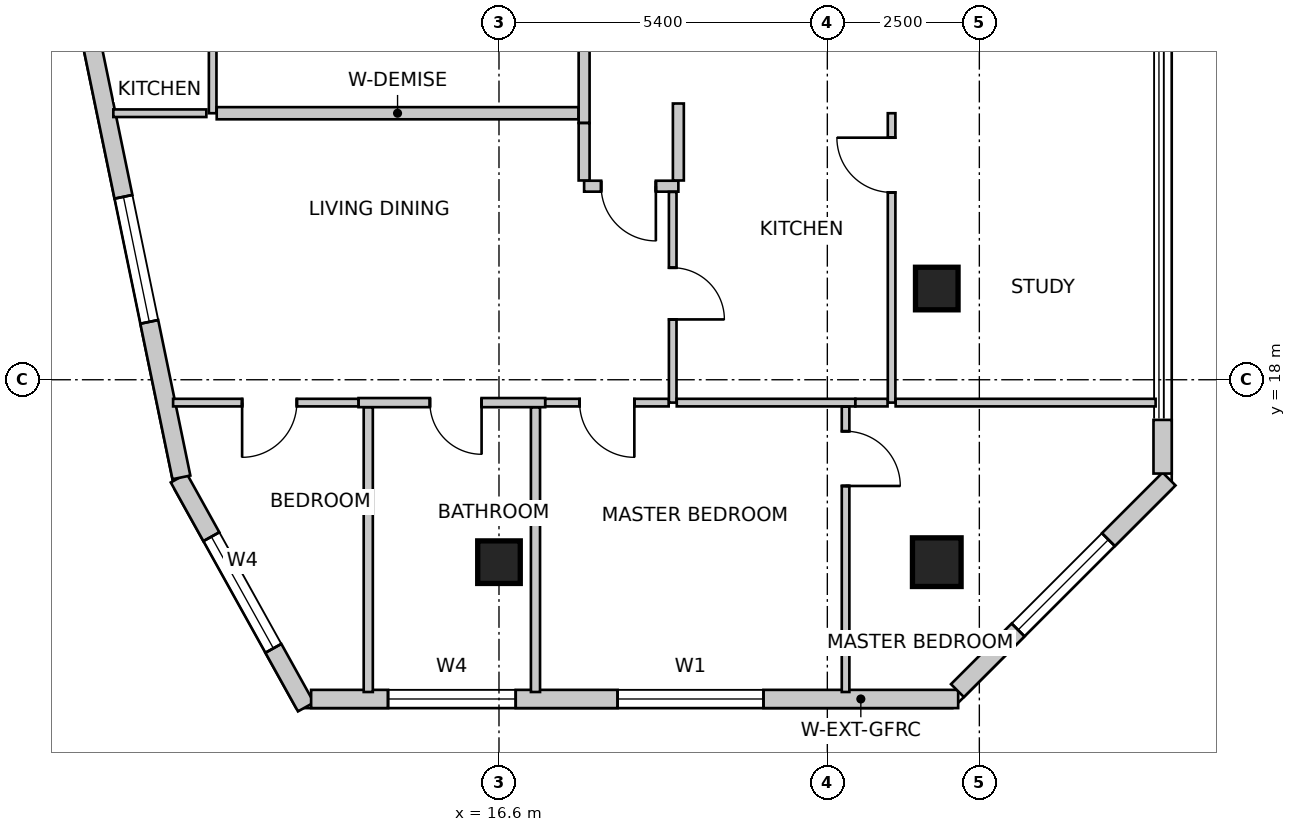
"""IFC4 building model, lengths in metres.
Left out: names, types, materials, properties, quantities, classifications, styles, units other than length and angle.
Written with IfcOpenShell. Run it as: python <this file> out.ifc"""

import sys

from ifc_helpers import new_model, si_unit, direction, frame, frame_2d, origin, origin_2d, place, context, subcontext, project, spatial, rectangle, extrude, source, transform, mapped, element, fill, save


model = new_model("IFC4")
c1 = context("Model", 3, precision=1e-05, world=origin(), true_north=direction((0.0, 1.0)))
c2 = subcontext(c1, "Body", "Model", "MODEL_VIEW")
j1 = project(units=[si_unit("LENGTHUNIT", "METRE"), si_unit("PLANEANGLEUNIT", "RADIAN")], contexts=[c1])
p1 = place(None, origin())
s1 = spatial("IfcSite", under=j1, at=p1, CompositionType="ELEMENT")
p2 = place(p1, origin())
s2 = spatial("IfcBuilding", under=s1, at=p2, CompositionType="ELEMENT")
p3 = place(p2, frame((0.0, 0.0, 214.9)))
s3 = spatial("IfcBuildingStorey", under=s2, at=p3, CompositionType="ELEMENT", Elevation=214.9)
m1 = source(origin(), c2, "Body", "SweptSolid", [
    extrude(rectangle(XDim=0.7, YDim=0.7, at=origin_2d()), origin(), (0.0, 0.0, 1.0), 3.5),
])
p4 = place(p3, frame((23.8, 19.5, 0.0), z_axis=(0.0, 0.0, 1.0), x_axis=(1.0, 0.0, 0.0)))
e1 = element("IfcColumn", 1, at=p4, inside=s3, PredefinedType="COLUMN", context=c2, shape_type="MappedRepresentation", body=[
    mapped(m1, transform((0.0, 0.0, 0.0), scale=1.0)),
])
m2 = source(origin(), c2, "Body", "SweptSolid", [
    extrude(rectangle(XDim=0.8, YDim=0.8, at=origin_2d()), origin(), (0.0, 0.0, 1.0), 3.5),
])
p5 = place(p3, frame((23.8, 15.0, 0.0), z_axis=(0.0, 0.0, 1.0), x_axis=(1.0, 0.0, 0.0)))
e2 = element("IfcColumn", 2, at=p5, inside=s3, PredefinedType="COLUMN", context=c2, shape_type="MappedRepresentation", body=[
    mapped(m2, transform((0.0, 0.0, 0.0), scale=1.0)),
])
p6 = place(p3, frame((16.6, 15.0, 0.0), z_axis=(0.0, 0.0, 1.0), x_axis=(1.0, 0.0, 0.0)))
e3 = element("IfcColumn", 3, at=p6, inside=s3, PredefinedType="COLUMN", context=c2, shape_type="MappedRepresentation", body=[
    mapped(m1, transform((0.0, 0.0, 0.0), scale=1.0)),
])
p7 = place(p3, frame((11.333, 16.384, 0.0), z_axis=(0.0, 0.0, 1.0), x_axis=(0.485633305139, -0.874162623852, 0.0)))
e4 = element("IfcWall", 4, at=p7, inside=s3, PredefinedType="SOLIDWALL", context=c2, shape_type="SweptSolid", body=[
    extrude(rectangle(XDim=4.307, YDim=0.3, at=frame_2d((2.153, 0.0))), origin(), (0.0, 0.0, 1.0), 3.25),
])
m3 = source(origin(), c2, "Body", "SweptSolid", [
    extrude(rectangle(XDim=2.1, YDim=2.0, at=frame_2d((1.05, 1.0))), frame((0.0, 0.16, 0.0), z_axis=(0.0, -1.0, 0.0), x_axis=(1.0, 0.0, 0.0)), (0.0, 0.0, 1.0), 0.32),
])
p8 = place(p7, frame((1.104, 0.0, 0.85)))
e5 = element("IfcOpeningElement", 5, at=p8, cuts=e4, PredefinedType="OPENING", context=c2, shape_type="MappedRepresentation", body=[
    mapped(m3, transform((0.0, 0.0, 0.0), scale=1.0)),
])
p9 = place(p3, frame((13.51, 12.75, 0.0), z_axis=(0.0, 0.0, 1.0), x_axis=(1.0, 0.0, 0.0)))
e6 = element("IfcWall", 6, at=p9, inside=s3, PredefinedType="SOLIDWALL", context=c2, shape_type="SweptSolid", body=[
    extrude(rectangle(XDim=10.642, YDim=0.3, at=frame_2d((5.321, 0.0))), origin(), (0.0, 0.0, 1.0), 3.25),
])
p10 = place(p9, frame((1.265, 0.0, 0.85)))
e7 = element("IfcOpeningElement", 7, at=p10, cuts=e6, PredefinedType="OPENING", context=c2, shape_type="MappedRepresentation", body=[
    mapped(m3, transform((0.0, 0.0, 0.0), scale=1.0)),
])
m4 = source(origin(), c2, "Body", "SweptSolid", [
    extrude(rectangle(XDim=2.4, YDim=2.2, at=frame_2d((1.2, 1.1))), frame((0.0, 0.16, 0.0), z_axis=(0.0, -1.0, 0.0), x_axis=(1.0, 0.0, 0.0)), (0.0, 0.0, 1.0), 0.32),
])
p11 = place(p9, frame((5.04, 0.0, 0.85)))
e8 = element("IfcOpeningElement", 8, at=p11, cuts=e6, PredefinedType="OPENING", context=c2, shape_type="MappedRepresentation", body=[
    mapped(m4, transform((0.0, 0.0, 0.0), scale=1.0)),
])
p12 = place(p3, frame((24.14, 12.888, 0.0), z_axis=(0.0, 0.0, 1.0), x_axis=(0.707106781187, 0.707106781187, 0.0)))
e9 = element("IfcWall", 9, at=p12, inside=s3, PredefinedType="SOLIDWALL", context=c2, shape_type="SweptSolid", body=[
    extrude(rectangle(XDim=4.922, YDim=0.3, at=frame_2d((2.461, 0.0))), origin(), (0.0, 0.0, 1.0), 3.25),
])
p13 = place(p12, frame((1.411, 0.0, 0.85)))
e10 = element("IfcOpeningElement", 10, at=p13, cuts=e9, PredefinedType="OPENING", context=c2, shape_type="MappedRepresentation", body=[
    mapped(m3, transform((0.0, 0.0, 0.0), scale=1.0)),
])
p14 = place(p3, frame((27.514, 16.457, 0.0), z_axis=(0.0, 0.0, 1.0), x_axis=(0.0, 1.0, 0.0)))
e11 = element("IfcWall", 11, at=p14, inside=s3, PredefinedType="SOLIDWALL", context=c2, shape_type="SweptSolid", body=[
    extrude(rectangle(XDim=0.882, YDim=0.3, at=frame_2d((0.441, 0.0))), origin(), (0.0, 0.0, 1.0), 3.25),
])
p15 = place(p3, frame((8.188, 31.834, 0.0), z_axis=(0.0, 0.0, 1.0), x_axis=(0.202303475707, -0.979322880217, 0.0)))
e12 = element("IfcWall", 12, at=p15, inside=s3, PredefinedType="SOLIDWALL", context=c2, shape_type="SweptSolid", body=[
    extrude(rectangle(XDim=15.766, YDim=0.3, at=frame_2d((7.883, 0.0))), origin(), (0.0, 0.0, 1.0), 3.25),
])
p16 = place(p15, frame((1.407, 0.0, 0.85)))
e13 = element("IfcOpeningElement", 13, at=p16, cuts=e12, PredefinedType="OPENING", context=c2, shape_type="MappedRepresentation", body=[
    mapped(m3, transform((0.0, 0.0, 0.0), scale=1.0)),
])
p17 = place(p15, frame((6.194, 0.0, 0.85)))
e14 = element("IfcOpeningElement", 14, at=p17, cuts=e12, PredefinedType="OPENING", context=c2, shape_type="MappedRepresentation", body=[
    mapped(m3, transform((0.0, 0.0, 0.0), scale=1.0)),
])
p18 = place(p15, frame((11.054, 0.0, 0.85)))
e15 = element("IfcOpeningElement", 15, at=p18, cuts=e12, PredefinedType="OPENING", context=c2, shape_type="MappedRepresentation", body=[
    mapped(m3, transform((0.0, 0.0, 0.0), scale=1.0)),
])
p19 = place(p3, frame((18.0, 22.223, 0.0), z_axis=(0.0, 0.0, 1.0), x_axis=(0.0, 1.0, 0.0)))
e16 = element("IfcWall", 16, at=p19, inside=s3, PredefinedType="PARTITIONING", context=c2, shape_type="SweptSolid", body=[
    extrude(rectangle(XDim=5.079, YDim=0.18, at=frame_2d((2.54, 0.0))), origin(), (0.0, 0.0, 1.0), 2.688),
])
m5 = source(origin(), c2, "Body", "SweptSolid", [
    extrude(rectangle(XDim=0.9, YDim=2.15, at=frame_2d((0.45, 1.075))), frame((0.0, 0.1, 0.0), z_axis=(0.0, -1.0, 0.0), x_axis=(1.0, 0.0, 0.0)), (0.0, 0.0, 1.0), 0.2),
])
p20 = place(p19, frame((2.09, 0.0, 0.0)))
e17 = element("IfcOpeningElement", 17, at=p20, cuts=e16, PredefinedType="OPENING", context=c2, shape_type="MappedRepresentation", body=[
    mapped(m5, transform((0.0, 0.0, 0.0), scale=1.0)),
])
p21 = place(p3, frame((19.55, 21.183, 0.0), z_axis=(0.0, 0.0, 1.0), x_axis=(-1.0, 0.0, 0.0)))
e18 = element("IfcWall", 18, at=p21, inside=s3, PredefinedType="PARTITIONING", context=c2, shape_type="SweptSolid", body=[
    extrude(rectangle(XDim=1.55, YDim=0.18, at=frame_2d((0.775, 0.0))), origin(), (0.0, 0.0, 1.0), 2.688),
])
p22 = place(p21, frame((0.37, 0.0, 0.0)))
e19 = element("IfcOpeningElement", 19, at=p22, cuts=e18, PredefinedType="OPENING", context=c2, shape_type="MappedRepresentation", body=[
    mapped(m5, transform((0.0, 0.0, 0.0), scale=1.0)),
])
p23 = place(p3, frame((18.0, 21.277, 0.0), z_axis=(0.0, 0.0, 1.0), x_axis=(0.0, 1.0, 0.0)))
e20 = element("IfcWall", 20, at=p23, inside=s3, PredefinedType="PARTITIONING", context=c2, shape_type="SweptSolid", body=[
    extrude(rectangle(XDim=0.944, YDim=0.18, at=frame_2d((0.472, 0.0))), origin(), (0.0, 0.0, 1.0), 2.688),
])
p24 = place(p3, frame((19.55, 22.543, 0.0), z_axis=(0.0, 0.0, 1.0), x_axis=(0.0, -1.0, 0.0)))
e21 = element("IfcWall", 21, at=p24, inside=s3, PredefinedType="PARTITIONING", context=c2, shape_type="SweptSolid", body=[
    extrude(rectangle(XDim=1.266, YDim=0.18, at=frame_2d((0.633, 0.0))), origin(), (0.0, 0.0, 1.0), 3.25),
])
p25 = place(p3, frame((11.891, 22.383, 0.0), z_axis=(0.0, 0.0, 1.0), x_axis=(0.0, 1.0, 0.0)))
e22 = element("IfcWall", 22, at=p25, inside=s3, PredefinedType="PARTITIONING", context=c2, shape_type="SweptSolid", body=[
    extrude(rectangle(XDim=4.759, YDim=0.125, at=frame_2d((2.379, 0.0))), origin(), (0.0, 0.0, 1.0), 2.688),
])
m6 = source(origin(), c2, "Body", "SweptSolid", [
    extrude(rectangle(XDim=0.85, YDim=2.15, at=frame_2d((0.425, 1.075))), frame((0.0, 0.073, 0.0), z_axis=(0.0, -1.0, 0.0), x_axis=(1.0, 0.0, 0.0)), (0.0, 0.0, 1.0), 0.145),
])
p26 = place(p25, frame((3.257, 0.0, 0.0)))
e23 = element("IfcOpeningElement", 23, at=p26, cuts=e22, PredefinedType="OPENING", context=c2, shape_type="MappedRepresentation", body=[
    mapped(m6, transform((0.0, 0.0, 0.0), scale=1.0)),
])
p27 = place(p3, frame((17.906, 22.383, 0.0), z_axis=(0.0, 0.0, 1.0), x_axis=(-1.0, 0.0, 0.0)))
e24 = element("IfcWall", 24, at=p27, inside=s3, PredefinedType="PARTITIONING", context=c2, shape_type="SweptSolid", body=[
    extrude(rectangle(XDim=5.948, YDim=0.2, at=frame_2d((2.974, 0.0))), origin(), (0.0, 0.0, 1.0), 2.688),
])
p28 = place(p3, frame((11.787, 22.383, 0.0), z_axis=(0.0, 0.0, 1.0), x_axis=(-1.0, 0.0, 0.0)))
e25 = element("IfcWall", 25, at=p28, inside=s3, PredefinedType="PARTITIONING", context=c2, shape_type="SweptSolid", body=[
    extrude(rectangle(XDim=1.53, YDim=0.125, at=frame_2d((0.765, 0.0))), origin(), (0.0, 0.0, 1.0), 3.25),
])
p29 = place(p3, frame((23.057, 17.624, 0.0), z_axis=(0.0, 0.0, 1.0), x_axis=(0.0, 1.0, 0.0)))
e26 = element("IfcWall", 26, at=p29, inside=s3, PredefinedType="PARTITIONING", context=c2, shape_type="SweptSolid", body=[
    extrude(rectangle(XDim=4.759, YDim=0.125, at=frame_2d((2.379, 0.0))), origin(), (0.0, 0.0, 1.0), 2.688),
])
m7 = source(origin(), c2, "Body", "SweptSolid", [
    extrude(rectangle(XDim=0.9, YDim=2.15, at=frame_2d((0.45, 1.075))), frame((0.0, 0.073, 0.0), z_axis=(0.0, -1.0, 0.0), x_axis=(1.0, 0.0, 0.0)), (0.0, 0.0, 1.0), 0.145),
])
p30 = place(p29, frame((3.457, 0.0, 0.0)))
e27 = element("IfcOpeningElement", 27, at=p30, cuts=e26, PredefinedType="OPENING", context=c2, shape_type="MappedRepresentation", body=[
    mapped(m7, transform((0.0, 0.0, 0.0), scale=1.0)),
])
p31 = place(p3, frame((27.399, 17.624, 0.0), z_axis=(0.0, 0.0, 1.0), x_axis=(-1.0, 0.0, 0.0)))
e28 = element("IfcWall", 28, at=p31, inside=s3, PredefinedType="PARTITIONING", context=c2, shape_type="SweptSolid", body=[
    extrude(rectangle(XDim=4.275, YDim=0.125, at=frame_2d((2.138, 0.0))), origin(), (0.0, 0.0, 1.0), 2.542),
])
p32 = place(p3, frame((19.457, 21.089, 0.0), z_axis=(0.0, 0.0, 1.0), x_axis=(0.0, -1.0, 0.0)))
e29 = element("IfcWall", 29, at=p32, inside=s3, PredefinedType="PARTITIONING", context=c2, shape_type="SweptSolid", body=[
    extrude(rectangle(XDim=3.465, YDim=0.125, at=frame_2d((1.732, 0.0))), origin(), (0.0, 0.0, 1.0), 2.688),
])
p33 = place(p32, frame((1.247, 0.0, 0.0)))
e30 = element("IfcOpeningElement", 30, at=p33, cuts=e29, PredefinedType="OPENING", context=c2, shape_type="MappedRepresentation", body=[
    mapped(m6, transform((0.0, 0.0, 0.0), scale=1.0)),
])
p34 = place(p3, frame((17.36, 17.624, 0.0), z_axis=(0.0, 0.0, 1.0), x_axis=(-1.0, 0.0, 0.0)))
e31 = element("IfcWall", 31, at=p34, inside=s3, PredefinedType="PARTITIONING", context=c2, shape_type="SweptSolid", body=[
    extrude(rectangle(XDim=3.07, YDim=0.15, at=frame_2d((1.535, 0.0))), origin(), (0.0, 0.0, 1.0), 3.25),
])
m8 = source(origin(), c2, "Body", "SweptSolid", [
    extrude(rectangle(XDim=0.85, YDim=2.15, at=frame_2d((0.425, 1.075))), frame((0.0, 0.085, 0.0), z_axis=(0.0, -1.0, 0.0), x_axis=(1.0, 0.0, 0.0)), (0.0, 0.0, 1.0), 0.17),
])
p35 = place(p34, frame((1.046, 0.0, 0.0)))
e32 = element("IfcOpeningElement", 32, at=p35, cuts=e31, PredefinedType="OPENING", context=c2, shape_type="MappedRepresentation", body=[
    mapped(m8, transform((0.0, 0.0, 0.0), scale=1.0)),
])
p36 = place(p3, frame((14.288, 17.624, 0.0), z_axis=(0.0, 0.0, 1.0), x_axis=(-1.0, 0.0, 0.0)))
e33 = element("IfcWall", 33, at=p36, inside=s3, PredefinedType="PARTITIONING", context=c2, shape_type="SweptSolid", body=[
    extrude(rectangle(XDim=3.048, YDim=0.125, at=frame_2d((1.524, 0.0))), origin(), (0.0, 0.0, 1.0), 3.25),
])
p37 = place(p36, frame((1.013, 0.0, 0.0)))
e34 = element("IfcOpeningElement", 34, at=p37, cuts=e33, PredefinedType="OPENING", context=c2, shape_type="MappedRepresentation", body=[
    mapped(m7, transform((0.0, 0.0, 0.0), scale=1.0)),
])
p38 = place(p3, frame((19.39, 17.624, 0.0), z_axis=(0.0, 0.0, 1.0), x_axis=(-1.0, 0.0, 0.0)))
e35 = element("IfcWall", 35, at=p38, inside=s3, PredefinedType="PARTITIONING", context=c2, shape_type="SweptSolid", body=[
    extrude(rectangle(XDim=2.028, YDim=0.125, at=frame_2d((1.014, 0.0))), origin(), (0.0, 0.0, 1.0), 3.25),
])
p39 = place(p38, frame((0.564, 0.0, 0.0)))
e36 = element("IfcOpeningElement", 36, at=p39, cuts=e35, PredefinedType="OPENING", context=c2, shape_type="MappedRepresentation", body=[
    mapped(m7, transform((0.0, 0.0, 0.0), scale=1.0)),
])
p40 = place(p3, frame((22.46, 17.624, 0.0), z_axis=(0.0, 0.0, 1.0), x_axis=(-1.0, 0.0, 0.0)))
e37 = element("IfcWall", 37, at=p40, inside=s3, PredefinedType="PARTITIONING", context=c2, shape_type="SweptSolid", body=[
    extrude(rectangle(XDim=2.937, YDim=0.125, at=frame_2d((1.468, 0.0))), origin(), (0.0, 0.0, 1.0), 2.688),
])
p41 = place(p3, frame((22.99, 17.624, 0.0), z_axis=(0.0, 0.0, 1.0), x_axis=(-1.0, 0.0, 0.0)))
e38 = element("IfcWall", 38, at=p41, inside=s3, PredefinedType="PARTITIONING", context=c2, shape_type="SweptSolid", body=[
    extrude(rectangle(XDim=0.529, YDim=0.125, at=frame_2d((0.264, 0.0))), origin(), (0.0, 0.0, 1.0), 3.25),
])
p42 = place(p3, frame((14.45, 12.865, 0.0), z_axis=(0.0, 0.0, 1.0), x_axis=(0.0, 1.0, 0.0)))
e39 = element("IfcWall", 39, at=p42, inside=s3, PredefinedType="PARTITIONING", context=c2, shape_type="SweptSolid", body=[
    extrude(rectangle(XDim=4.68, YDim=0.15, at=frame_2d((2.34, 0.0))), origin(), (0.0, 0.0, 1.0), 3.25),
])
p43 = place(p3, frame((17.2, 17.545, 0.0), z_axis=(0.0, 0.0, 1.0), x_axis=(0.0, -1.0, 0.0)))
e40 = element("IfcWall", 40, at=p43, inside=s3, PredefinedType="PARTITIONING", context=c2, shape_type="SweptSolid", body=[
    extrude(rectangle(XDim=4.68, YDim=0.15, at=frame_2d((2.34, 0.0))), origin(), (0.0, 0.0, 1.0), 2.542),
])
p44 = place(p3, frame((22.3, 17.558, 0.0), z_axis=(0.0, 0.0, 1.0), x_axis=(0.0, -1.0, 0.0)))
e41 = element("IfcWall", 41, at=p44, inside=s3, PredefinedType="PARTITIONING", context=c2, shape_type="SweptSolid", body=[
    extrude(rectangle(XDim=4.693, YDim=0.125, at=frame_2d((2.346, 0.0))), origin(), (0.0, 0.0, 1.0), 2.542),
])
p45 = place(p44, frame((0.404, 0.0, 0.0)))
e42 = element("IfcOpeningElement", 42, at=p45, cuts=e41, PredefinedType="OPENING", context=c2, shape_type="MappedRepresentation", body=[
    mapped(m7, transform((0.0, 0.0, 0.0), scale=1.0)),
])
m9 = source(origin(), c2, "Body", "SweptSolid", [
    extrude(rectangle(XDim=2.1, YDim=2.0, at=frame_2d((1.05, 1.0))), frame((0.0, -0.015, 0.0), z_axis=(0.0, -1.0, 0.0), x_axis=(1.0, 0.0, 0.0)), (0.0, 0.0, 1.0), 0.06),
])
p46 = place(p8, origin())
e43 = element("IfcWindow", 43, at=p46, inside=s3, PartitioningType="SINGLE_PANEL", PredefinedType="WINDOW", context=c2, shape_type="MappedRepresentation", body=[
    mapped(m9, transform((0.0, 0.0, 0.0), scale=1.0)),
])
fill(e5, e43)
p47 = place(p10, origin())
e44 = element("IfcWindow", 44, at=p47, inside=s3, PartitioningType="SINGLE_PANEL", PredefinedType="WINDOW", context=c2, shape_type="MappedRepresentation", body=[
    mapped(m9, transform((0.0, 0.0, 0.0), scale=1.0)),
])
fill(e7, e44)
m10 = source(origin(), c2, "Body", "SweptSolid", [
    extrude(rectangle(XDim=2.4, YDim=2.2, at=frame_2d((1.2, 1.1))), frame((0.0, -0.015, 0.0), z_axis=(0.0, -1.0, 0.0), x_axis=(1.0, 0.0, 0.0)), (0.0, 0.0, 1.0), 0.06),
])
p48 = place(p11, origin())
e45 = element("IfcWindow", 45, at=p48, inside=s3, PartitioningType="SINGLE_PANEL", PredefinedType="WINDOW", context=c2, shape_type="MappedRepresentation", body=[
    mapped(m10, transform((0.0, 0.0, 0.0), scale=1.0)),
])
fill(e8, e45)
p49 = place(p13, origin())
e46 = element("IfcWindow", 46, at=p49, inside=s3, PartitioningType="SINGLE_PANEL", PredefinedType="WINDOW", context=c2, shape_type="MappedRepresentation", body=[
    mapped(m9, transform((0.0, 0.0, 0.0), scale=1.0)),
])
fill(e10, e46)
p50 = place(p18, origin())
e47 = element("IfcWindow", 47, at=p50, inside=s3, PartitioningType="SINGLE_PANEL", PredefinedType="WINDOW", context=c2, shape_type="MappedRepresentation", body=[
    mapped(m9, transform((0.0, 0.0, 0.0), scale=1.0)),
])
fill(e15, e47)
m11 = source(origin(), c2, "Body", "SweptSolid", [
    extrude(rectangle(XDim=0.9, YDim=2.15, at=frame_2d((0.45, 1.075))), frame((0.0, 0.025, 0.0), z_axis=(0.0, -1.0, 0.0), x_axis=(1.0, 0.0, 0.0)), (0.0, 0.0, 1.0), 0.05),
])
p51 = place(p30, origin())
e48 = element("IfcDoor", 48, at=p51, inside=s3, OperationType="SINGLE_SWING_RIGHT", PredefinedType="DOOR", context=c2, shape_type="MappedRepresentation", body=[
    mapped(m11, transform((0.0, 0.0, 0.0), scale=1.0)),
])
fill(e27, e48)
m12 = source(origin(), c2, "Body", "SweptSolid", [
    extrude(rectangle(XDim=0.9, YDim=2.15, at=frame_2d((0.45, 1.075))), frame((0.0, 0.025, 0.0), z_axis=(0.0, -1.0, 0.0), x_axis=(1.0, 0.0, 0.0)), (0.0, 0.0, 1.0), 0.05),
])
p52 = place(p22, origin())
e49 = element("IfcDoor", 49, at=p52, inside=s3, OperationType="SINGLE_SWING_LEFT", PredefinedType="DOOR", context=c2, shape_type="MappedRepresentation", body=[
    mapped(m12, transform((0.0, 0.0, 0.0), scale=1.0)),
])
fill(e19, e49)
m13 = source(origin(), c2, "Body", "SweptSolid", [
    extrude(rectangle(XDim=0.85, YDim=2.15, at=frame_2d((0.425, 1.075))), frame((0.0, 0.025, 0.0), z_axis=(0.0, -1.0, 0.0), x_axis=(1.0, 0.0, 0.0)), (0.0, 0.0, 1.0), 0.05),
])
p53 = place(p33, origin())
e50 = element("IfcDoor", 50, at=p53, inside=s3, OperationType="SINGLE_SWING_RIGHT", PredefinedType="DOOR", context=c2, shape_type="MappedRepresentation", body=[
    mapped(m13, transform((0.0, 0.0, 0.0), scale=1.0)),
])
fill(e30, e50)
p54 = place(p35, origin())
e51 = element("IfcDoor", 51, at=p54, inside=s3, OperationType="SINGLE_SWING_LEFT", PredefinedType="DOOR", context=c2, shape_type="MappedRepresentation", body=[
    mapped(m13, transform((0.0, 0.0, 0.0), scale=1.0)),
])
fill(e32, e51)
p55 = place(p37, origin())
e52 = element("IfcDoor", 52, at=p55, inside=s3, OperationType="SINGLE_SWING_RIGHT", PredefinedType="DOOR", context=c2, shape_type="MappedRepresentation", body=[
    mapped(m11, transform((0.0, 0.0, 0.0), scale=1.0)),
])
fill(e34, e52)
p56 = place(p39, origin())
e53 = element("IfcDoor", 53, at=p56, inside=s3, OperationType="SINGLE_SWING_LEFT", PredefinedType="DOOR", context=c2, shape_type="MappedRepresentation", body=[
    mapped(m11, transform((0.0, 0.0, 0.0), scale=1.0)),
])
fill(e36, e53)
p57 = place(p45, origin())
e54 = element("IfcDoor", 54, at=p57, inside=s3, OperationType="SINGLE_SWING_RIGHT", PredefinedType="DOOR", context=c2, shape_type="MappedRepresentation", body=[
    mapped(m11, transform((0.0, 0.0, 0.0), scale=1.0)),
])
fill(e42, e54)
save(model, sys.argv[1])
